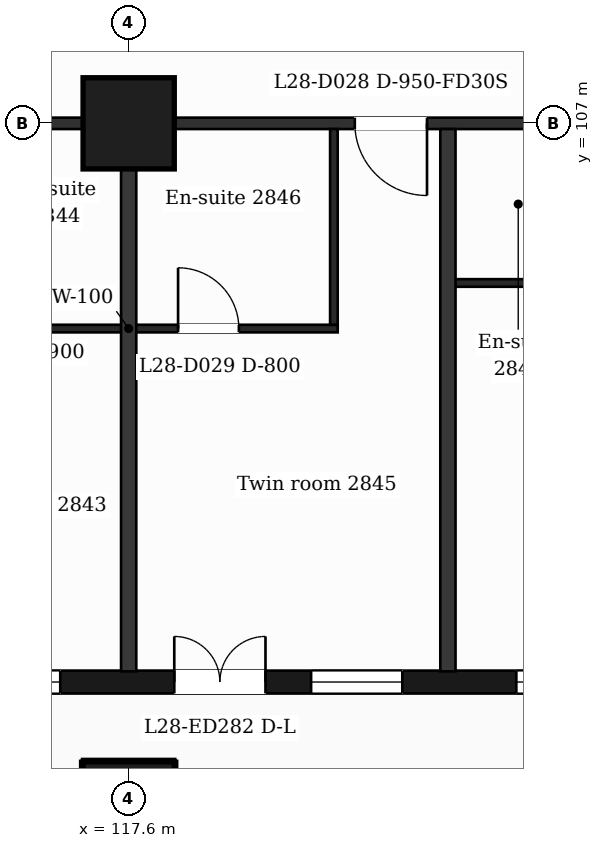
"""IFC4 building model, lengths in metres.
Left out: names, types, materials, properties, quantities, classifications, styles, units other than length and angle.
Written with IfcOpenShell. Run it as: python <this file> out.ifc"""

import sys

from ifc_helpers import new_model, si_unit, direction, frame, frame_2d, origin, origin_2d, place, context, subcontext, project, spatial, rectangle, extrude, element, fill, save


model = new_model("IFC4")
c1 = context("Model", 3, precision=1e-05, world=origin(), true_north=direction((0.0, 1.0)))
c2 = subcontext(c1, "Body", "Model", "MODEL_VIEW")
j1 = project(units=[si_unit("LENGTHUNIT", "METRE"), si_unit("PLANEANGLEUNIT", "RADIAN")], contexts=[c1])
p1 = place(None, origin())
s1 = spatial("IfcSite", under=j1, at=p1, CompositionType="ELEMENT")
p2 = place(p1, origin())
s2 = spatial("IfcBuilding", under=s1, at=p2, CompositionType="ELEMENT")
p3 = place(p2, frame((0.0, 0.0, 120.6)))
s3 = spatial("IfcBuildingStorey", under=s2, at=p3, CompositionType="ELEMENT", Elevation=120.6)
for number, where, z_axis, x_axis in (
    (1, (117.6, 98.0, 0.0), (0.0, 0.0, 1.0), (1.0, 0.0, 0.0)),
    (2, (117.6, 107.0, 0.0), (0.0, 0.0, 1.0), (1.0, 0.0, 0.0)),
):
    element("IfcColumn", number, at=place(p3, frame(where, z_axis=z_axis, x_axis=x_axis)), inside=s3, PredefinedType="COLUMN", context=c2, shape_type="SweptSolid", body=[
        extrude(rectangle(XDim=1.2, YDim=1.2, at=origin_2d()), origin(), (0.0, 0.0, 1.0), 3.7),
    ])
p4 = place(p3, frame((89.85, 99.65, 0.0), z_axis=(0.0, 0.0, 1.0), x_axis=(1.0, 0.0, 0.0)))
e3 = element("IfcWall", 3, at=p4, inside=s3, PredefinedType="SOLIDWALL", context=c2, shape_type="SweptSolid", body=[
    extrude(rectangle(XDim=47.25, YDim=0.3, at=frame_2d((23.625, 0.0))), origin(), (0.0, 0.0, 1.0), 3.38),
])
p5 = place(p4, frame((0.725, 0.0, 0.9)))
e4 = element("IfcOpeningElement", 4, at=p5, cuts=e3, PredefinedType="OPENING", context=c2, shape_type="SweptSolid", body=[
    extrude(rectangle(XDim=1.2, YDim=2.1, at=frame_2d((0.6, 1.05))), frame((0.0, 0.16, 0.0), z_axis=(0.0, -1.0, 0.0), x_axis=(1.0, 0.0, 0.0)), (0.0, 0.0, 1.0), 0.32),
])
p6 = place(p4, frame((3.45, 0.0, 0.9)))
e5 = element("IfcOpeningElement", 5, at=p6, cuts=e3, PredefinedType="OPENING", context=c2, shape_type="SweptSolid", body=[
    extrude(rectangle(XDim=2.4, YDim=2.1, at=frame_2d((1.2, 1.05))), frame((0.0, 0.16, 0.0), z_axis=(0.0, -1.0, 0.0), x_axis=(1.0, 0.0, 0.0)), (0.0, 0.0, 1.0), 0.32),
])
p7 = place(p4, frame((7.65, 0.0, 0.9)))
e6 = element("IfcOpeningElement", 6, at=p7, cuts=e3, PredefinedType="OPENING", context=c2, shape_type="SweptSolid", body=[
    extrude(rectangle(XDim=2.4, YDim=2.1, at=frame_2d((1.2, 1.05))), frame((0.0, 0.16, 0.0), z_axis=(0.0, -1.0, 0.0), x_axis=(1.0, 0.0, 0.0)), (0.0, 0.0, 1.0), 0.32),
])
p8 = place(p4, frame((12.45, 0.0, 0.9)))
e7 = element("IfcOpeningElement", 7, at=p8, cuts=e3, PredefinedType="OPENING", context=c2, shape_type="SweptSolid", body=[
    extrude(rectangle(XDim=1.2, YDim=2.1, at=frame_2d((0.6, 1.05))), frame((0.0, 0.16, 0.0), z_axis=(0.0, -1.0, 0.0), x_axis=(1.0, 0.0, 0.0)), (0.0, 0.0, 1.0), 0.32),
])
p9 = place(p4, frame((16.65, 0.0, 0.9)))
e8 = element("IfcOpeningElement", 8, at=p9, cuts=e3, PredefinedType="OPENING", context=c2, shape_type="SweptSolid", body=[
    extrude(rectangle(XDim=1.2, YDim=2.1, at=frame_2d((0.6, 1.05))), frame((0.0, 0.16, 0.0), z_axis=(0.0, -1.0, 0.0), x_axis=(1.0, 0.0, 0.0)), (0.0, 0.0, 1.0), 0.32),
])
p10 = place(p4, frame((19.95, 0.0, 0.0)))
e9 = element("IfcOpeningElement", 9, at=p10, cuts=e3, PredefinedType="OPENING", context=c2, shape_type="SweptSolid", body=[
    extrude(rectangle(XDim=1.2, YDim=2.4, at=frame_2d((0.6, 1.2))), frame((0.0, 0.16, 0.0), z_axis=(0.0, -1.0, 0.0), x_axis=(1.0, 0.0, 0.0)), (0.0, 0.0, 1.0), 0.32),
])
p11 = place(p4, frame((21.75, 0.0, 0.9)))
e10 = element("IfcOpeningElement", 10, at=p11, cuts=e3, PredefinedType="OPENING", context=c2, shape_type="SweptSolid", body=[
    extrude(rectangle(XDim=1.2, YDim=2.1, at=frame_2d((0.6, 1.05))), frame((0.0, 0.16, 0.0), z_axis=(0.0, -1.0, 0.0), x_axis=(1.0, 0.0, 0.0)), (0.0, 0.0, 1.0), 0.32),
])
p12 = place(p4, frame((24.45, 0.0, 0.9)))
e11 = element("IfcOpeningElement", 11, at=p12, cuts=e3, PredefinedType="OPENING", context=c2, shape_type="SweptSolid", body=[
    extrude(rectangle(XDim=2.4, YDim=2.1, at=frame_2d((1.2, 1.05))), frame((0.0, 0.16, 0.0), z_axis=(0.0, -1.0, 0.0), x_axis=(1.0, 0.0, 0.0)), (0.0, 0.0, 1.0), 0.32),
])
p13 = place(p4, frame((28.35, 0.0, 0.0)))
e12 = element("IfcOpeningElement", 12, at=p13, cuts=e3, PredefinedType="OPENING", context=c2, shape_type="SweptSolid", body=[
    extrude(rectangle(XDim=1.2, YDim=2.4, at=frame_2d((0.6, 1.2))), frame((0.0, 0.16, 0.0), z_axis=(0.0, -1.0, 0.0), x_axis=(1.0, 0.0, 0.0)), (0.0, 0.0, 1.0), 0.32),
])
p14 = place(p4, frame((30.15, 0.0, 0.9)))
e13 = element("IfcOpeningElement", 13, at=p14, cuts=e3, PredefinedType="OPENING", context=c2, shape_type="SweptSolid", body=[
    extrude(rectangle(XDim=1.2, YDim=2.1, at=frame_2d((0.6, 1.05))), frame((0.0, 0.16, 0.0), z_axis=(0.0, -1.0, 0.0), x_axis=(1.0, 0.0, 0.0)), (0.0, 0.0, 1.0), 0.32),
])
p15 = place(p4, frame((32.85, 0.0, 0.9)))
e14 = element("IfcOpeningElement", 14, at=p15, cuts=e3, PredefinedType="OPENING", context=c2, shape_type="SweptSolid", body=[
    extrude(rectangle(XDim=2.4, YDim=2.1, at=frame_2d((1.2, 1.05))), frame((0.0, 0.16, 0.0), z_axis=(0.0, -1.0, 0.0), x_axis=(1.0, 0.0, 0.0)), (0.0, 0.0, 1.0), 0.32),
])
p16 = place(p4, frame((37.05, 0.0, 0.9)))
e15 = element("IfcOpeningElement", 15, at=p16, cuts=e3, PredefinedType="OPENING", context=c2, shape_type="SweptSolid", body=[
    extrude(rectangle(XDim=2.4, YDim=2.1, at=frame_2d((1.2, 1.05))), frame((0.0, 0.16, 0.0), z_axis=(0.0, -1.0, 0.0), x_axis=(1.0, 0.0, 0.0)), (0.0, 0.0, 1.0), 0.32),
])
p17 = place(p4, frame((41.85, 0.0, 0.9)))
e16 = element("IfcOpeningElement", 16, at=p17, cuts=e3, PredefinedType="OPENING", context=c2, shape_type="SweptSolid", body=[
    extrude(rectangle(XDim=1.2, YDim=2.1, at=frame_2d((0.6, 1.05))), frame((0.0, 0.16, 0.0), z_axis=(0.0, -1.0, 0.0), x_axis=(1.0, 0.0, 0.0)), (0.0, 0.0, 1.0), 0.32),
])
p18 = place(p4, frame((45.25, 0.0, 0.9)))
e17 = element("IfcOpeningElement", 17, at=p18, cuts=e3, PredefinedType="OPENING", context=c2, shape_type="SweptSolid", body=[
    extrude(rectangle(XDim=1.2, YDim=2.1, at=frame_2d((0.6, 1.05))), frame((0.0, 0.16, 0.0), z_axis=(0.0, -1.0, 0.0), x_axis=(1.0, 0.0, 0.0)), (0.0, 0.0, 1.0), 0.32),
])
p19 = place(p3, frame((114.85, 104.3, 0.0), z_axis=(0.0, 0.0, 1.0), x_axis=(1.0, 0.0, 0.0)))
e18 = element("IfcWall", 18, at=p19, inside=s3, PredefinedType="PARTITIONING", context=c2, shape_type="SweptSolid", body=[
    extrude(rectangle(XDim=5.5, YDim=0.1, at=frame_2d((2.75, 0.0))), origin(), (0.0, 0.0, 1.0), 3.38),
])
p20 = place(p19, frame((3.4, 0.0, 0.0)))
e19 = element("IfcOpeningElement", 19, at=p20, cuts=e18, PredefinedType="OPENING", context=c2, shape_type="SweptSolid", body=[
    extrude(rectangle(XDim=0.8, YDim=2.1, at=frame_2d((0.4, 1.05))), frame((0.0, 0.06, 0.0), z_axis=(0.0, -1.0, 0.0), x_axis=(1.0, 0.0, 0.0)), (0.0, 0.0, 1.0), 0.12),
])
p21 = place(p3, frame((121.8, 104.9, 0.0), z_axis=(0.0, 0.0, 1.0), x_axis=(1.0, 0.0, 0.0)))
e20 = element("IfcWall", 20, at=p21, inside=s3, PredefinedType="PARTITIONING", context=c2, shape_type="SweptSolid", body=[
    extrude(rectangle(XDim=1.85, YDim=0.1, at=frame_2d((0.925, 0.0))), origin(), (0.0, 0.0, 1.0), 3.38),
])
p22 = place(p3, frame((87.018, 107.0, 0.0), z_axis=(0.0, 0.0, 1.0), x_axis=(1.0, 0.0, 0.0)))
e21 = element("IfcWall", 21, at=p22, inside=s3, PredefinedType="PARTITIONING", context=c2, shape_type="SweptSolid", body=[
    extrude(rectangle(XDim=52.765, YDim=0.15, at=frame_2d((26.382, 0.0))), origin(), (0.0, 0.0, 1.0), 3.38),
])
p23 = place(p22, frame((1.276, 0.0, 0.0)))
e22 = element("IfcOpeningElement", 22, at=p23, cuts=e21, PredefinedType="OPENING", context=c2, shape_type="SweptSolid", body=[
    extrude(rectangle(XDim=0.95, YDim=2.1, at=frame_2d((0.475, 1.05))), frame((0.0, 0.085, 0.0), z_axis=(0.0, -1.0, 0.0), x_axis=(1.0, 0.0, 0.0)), (0.0, 0.0, 1.0), 0.17),
])
p24 = place(p22, frame((6.192, 0.0, 0.0)))
e23 = element("IfcOpeningElement", 23, at=p24, cuts=e21, PredefinedType="OPENING", context=c2, shape_type="SweptSolid", body=[
    extrude(rectangle(XDim=0.95, YDim=2.1, at=frame_2d((0.475, 1.05))), frame((0.0, 0.085, 0.0), z_axis=(0.0, -1.0, 0.0), x_axis=(1.0, 0.0, 0.0)), (0.0, 0.0, 1.0), 0.17),
])
p25 = place(p22, frame((11.982, 0.0, 0.0)))
e24 = element("IfcOpeningElement", 24, at=p25, cuts=e21, PredefinedType="OPENING", context=c2, shape_type="SweptSolid", body=[
    extrude(rectangle(XDim=1.0, YDim=2.1, at=frame_2d((0.5, 1.05))), frame((0.0, 0.085, 0.0), z_axis=(0.0, -1.0, 0.0), x_axis=(1.0, 0.0, 0.0)), (0.0, 0.0, 1.0), 0.17),
])
p26 = place(p22, frame((14.582, 0.0, 0.0)))
e25 = element("IfcOpeningElement", 25, at=p26, cuts=e21, PredefinedType="OPENING", context=c2, shape_type="SweptSolid", body=[
    extrude(rectangle(XDim=0.95, YDim=2.1, at=frame_2d((0.475, 1.05))), frame((0.0, 0.085, 0.0), z_axis=(0.0, -1.0, 0.0), x_axis=(1.0, 0.0, 0.0)), (0.0, 0.0, 1.0), 0.17),
])
p27 = place(p22, frame((18.257, 0.0, 0.0)))
e26 = element("IfcOpeningElement", 26, at=p27, cuts=e21, PredefinedType="OPENING", context=c2, shape_type="SweptSolid", body=[
    extrude(rectangle(XDim=0.95, YDim=2.1, at=frame_2d((0.475, 1.05))), frame((0.0, 0.085, 0.0), z_axis=(0.0, -1.0, 0.0), x_axis=(1.0, 0.0, 0.0)), (0.0, 0.0, 1.0), 0.17),
])
p28 = place(p22, frame((22.992, 0.0, 0.0)))
e27 = element("IfcOpeningElement", 27, at=p28, cuts=e21, PredefinedType="OPENING", context=c2, shape_type="SweptSolid", body=[
    extrude(rectangle(XDim=0.95, YDim=2.1, at=frame_2d((0.475, 1.05))), frame((0.0, 0.085, 0.0), z_axis=(0.0, -1.0, 0.0), x_axis=(1.0, 0.0, 0.0)), (0.0, 0.0, 1.0), 0.17),
])
p29 = place(p22, frame((26.632, 0.0, 0.0)))
e28 = element("IfcOpeningElement", 28, at=p29, cuts=e21, PredefinedType="OPENING", context=c2, shape_type="SweptSolid", body=[
    extrude(rectangle(XDim=1.0, YDim=2.1, at=frame_2d((0.5, 1.05))), frame((0.0, 0.085, 0.0), z_axis=(0.0, -1.0, 0.0), x_axis=(1.0, 0.0, 0.0)), (0.0, 0.0, 1.0), 0.17),
])
p30 = place(p22, frame((33.557, 0.0, 0.0)))
e29 = element("IfcOpeningElement", 29, at=p30, cuts=e21, PredefinedType="OPENING", context=c2, shape_type="SweptSolid", body=[
    extrude(rectangle(XDim=0.95, YDim=2.1, at=frame_2d((0.475, 1.05))), frame((0.0, 0.085, 0.0), z_axis=(0.0, -1.0, 0.0), x_axis=(1.0, 0.0, 0.0)), (0.0, 0.0, 1.0), 0.17),
])
p31 = place(p22, frame((37.182, 0.0, 0.0)))
e30 = element("IfcOpeningElement", 30, at=p31, cuts=e21, PredefinedType="OPENING", context=c2, shape_type="SweptSolid", body=[
    extrude(rectangle(XDim=0.95, YDim=2.1, at=frame_2d((0.475, 1.05))), frame((0.0, 0.085, 0.0), z_axis=(0.0, -1.0, 0.0), x_axis=(1.0, 0.0, 0.0)), (0.0, 0.0, 1.0), 0.17),
])
p32 = place(p22, frame((41.957, 0.0, 0.0)))
e31 = element("IfcOpeningElement", 31, at=p32, cuts=e21, PredefinedType="OPENING", context=c2, shape_type="SweptSolid", body=[
    extrude(rectangle(XDim=0.95, YDim=2.1, at=frame_2d((0.475, 1.05))), frame((0.0, 0.085, 0.0), z_axis=(0.0, -1.0, 0.0), x_axis=(1.0, 0.0, 0.0)), (0.0, 0.0, 1.0), 0.17),
])
p33 = place(p22, frame((45.622, 0.0, 0.0)))
e32 = element("IfcOpeningElement", 32, at=p33, cuts=e21, PredefinedType="OPENING", context=c2, shape_type="SweptSolid", body=[
    extrude(rectangle(XDim=0.95, YDim=2.1, at=frame_2d((0.475, 1.05))), frame((0.0, 0.085, 0.0), z_axis=(0.0, -1.0, 0.0), x_axis=(1.0, 0.0, 0.0)), (0.0, 0.0, 1.0), 0.17),
])
p34 = place(p22, frame((48.56, 0.0, 0.0)))
e33 = element("IfcOpeningElement", 33, at=p34, cuts=e21, PredefinedType="OPENING", context=c2, shape_type="SweptSolid", body=[
    extrude(rectangle(XDim=0.95, YDim=2.1, at=frame_2d((0.475, 1.05))), frame((0.0, 0.085, 0.0), z_axis=(0.0, -1.0, 0.0), x_axis=(1.0, 0.0, 0.0)), (0.0, 0.0, 1.0), 0.17),
])
p35 = place(p3, frame((117.6, 99.79, 0.0), z_axis=(0.0, 0.0, 1.0), x_axis=(0.0, 1.0, 0.0)))
e34 = element("IfcWall", 34, at=p35, inside=s3, PredefinedType="PARTITIONING", context=c2, shape_type="SweptSolid", body=[
    extrude(rectangle(XDim=7.135, YDim=0.2, at=frame_2d((3.567, 0.0))), origin(), (0.0, 0.0, 1.0), 3.38),
])
p36 = place(p3, frame((120.3, 104.35, 0.0), z_axis=(0.0, 0.0, 1.0), x_axis=(0.0, 1.0, 0.0)))
e35 = element("IfcWall", 35, at=p36, inside=s3, PredefinedType="PARTITIONING", context=c2, shape_type="SweptSolid", body=[
    extrude(rectangle(XDim=2.575, YDim=0.1, at=frame_2d((1.288, 0.0))), origin(), (0.0, 0.0, 1.0), 3.38),
])
p37 = place(p3, frame((121.8, 99.79, 0.0), z_axis=(0.0, 0.0, 1.0), x_axis=(0.0, 1.0, 0.0)))
e36 = element("IfcWall", 36, at=p37, inside=s3, PredefinedType="PARTITIONING", context=c2, shape_type="SweptSolid", body=[
    extrude(rectangle(XDim=7.135, YDim=0.2, at=frame_2d((3.567, 0.0))), origin(), (0.0, 0.0, 1.0), 3.38),
])
p38 = place(p12, origin())
e37 = element("IfcWindow", 37, at=p38, inside=s3, PartitioningType="SINGLE_PANEL", PredefinedType="WINDOW", context=c2, shape_type="SweptSolid", body=[
    extrude(rectangle(XDim=2.4, YDim=2.1, at=frame_2d((1.2, 1.05))), frame((0.0, 0.03, 0.0), z_axis=(0.0, -1.0, 0.0), x_axis=(1.0, 0.0, 0.0)), (0.0, 0.0, 1.0), 0.06),
])
fill(e11, e37)
p39 = place(p13, origin())
e38 = element("IfcDoor", 38, at=p39, inside=s3, OperationType="DOUBLE_DOOR_SINGLE_SWING", PredefinedType="DOOR", context=c2, shape_type="SweptSolid", body=[
    extrude(rectangle(XDim=1.2, YDim=2.4, at=frame_2d((0.6, 1.2))), frame((0.0, 0.025, 0.0), z_axis=(0.0, -1.0, 0.0), x_axis=(1.0, 0.0, 0.0)), (0.0, 0.0, 1.0), 0.05),
])
fill(e12, e38)
p40 = place(p14, origin())
e39 = element("IfcWindow", 39, at=p40, inside=s3, PartitioningType="SINGLE_PANEL", PredefinedType="WINDOW", context=c2, shape_type="SweptSolid", body=[
    extrude(rectangle(XDim=1.2, YDim=2.1, at=frame_2d((0.6, 1.05))), frame((0.0, 0.03, 0.0), z_axis=(0.0, -1.0, 0.0), x_axis=(1.0, 0.0, 0.0)), (0.0, 0.0, 1.0), 0.06),
])
fill(e13, e39)
p41 = place(p15, origin())
e40 = element("IfcWindow", 40, at=p41, inside=s3, PartitioningType="SINGLE_PANEL", PredefinedType="WINDOW", context=c2, shape_type="SweptSolid", body=[
    extrude(rectangle(XDim=2.4, YDim=2.1, at=frame_2d((1.2, 1.05))), frame((0.0, 0.03, 0.0), z_axis=(0.0, -1.0, 0.0), x_axis=(1.0, 0.0, 0.0)), (0.0, 0.0, 1.0), 0.06),
])
fill(e14, e40)
p42 = place(p30, origin())
e41 = element("IfcDoor", 41, at=p42, inside=s3, OperationType="SINGLE_SWING_RIGHT", PredefinedType="DOOR", context=c2, shape_type="SweptSolid", body=[
    extrude(rectangle(XDim=0.95, YDim=2.1, at=frame_2d((0.475, 1.05))), frame((0.0, 0.025, 0.0), z_axis=(0.0, -1.0, 0.0), x_axis=(1.0, 0.0, 0.0)), (0.0, 0.0, 1.0), 0.05),
])
fill(e29, e41)
p43 = place(p20, origin())
e42 = element("IfcDoor", 42, at=p43, inside=s3, OperationType="SINGLE_SWING_LEFT", PredefinedType="DOOR", context=c2, shape_type="SweptSolid", body=[
    extrude(rectangle(XDim=0.8, YDim=2.1, at=frame_2d((0.4, 1.05))), frame((0.0, 0.025, 0.0), z_axis=(0.0, -1.0, 0.0), x_axis=(1.0, 0.0, 0.0)), (0.0, 0.0, 1.0), 0.05),
])
fill(e19, e42)
save(model, sys.argv[1])
